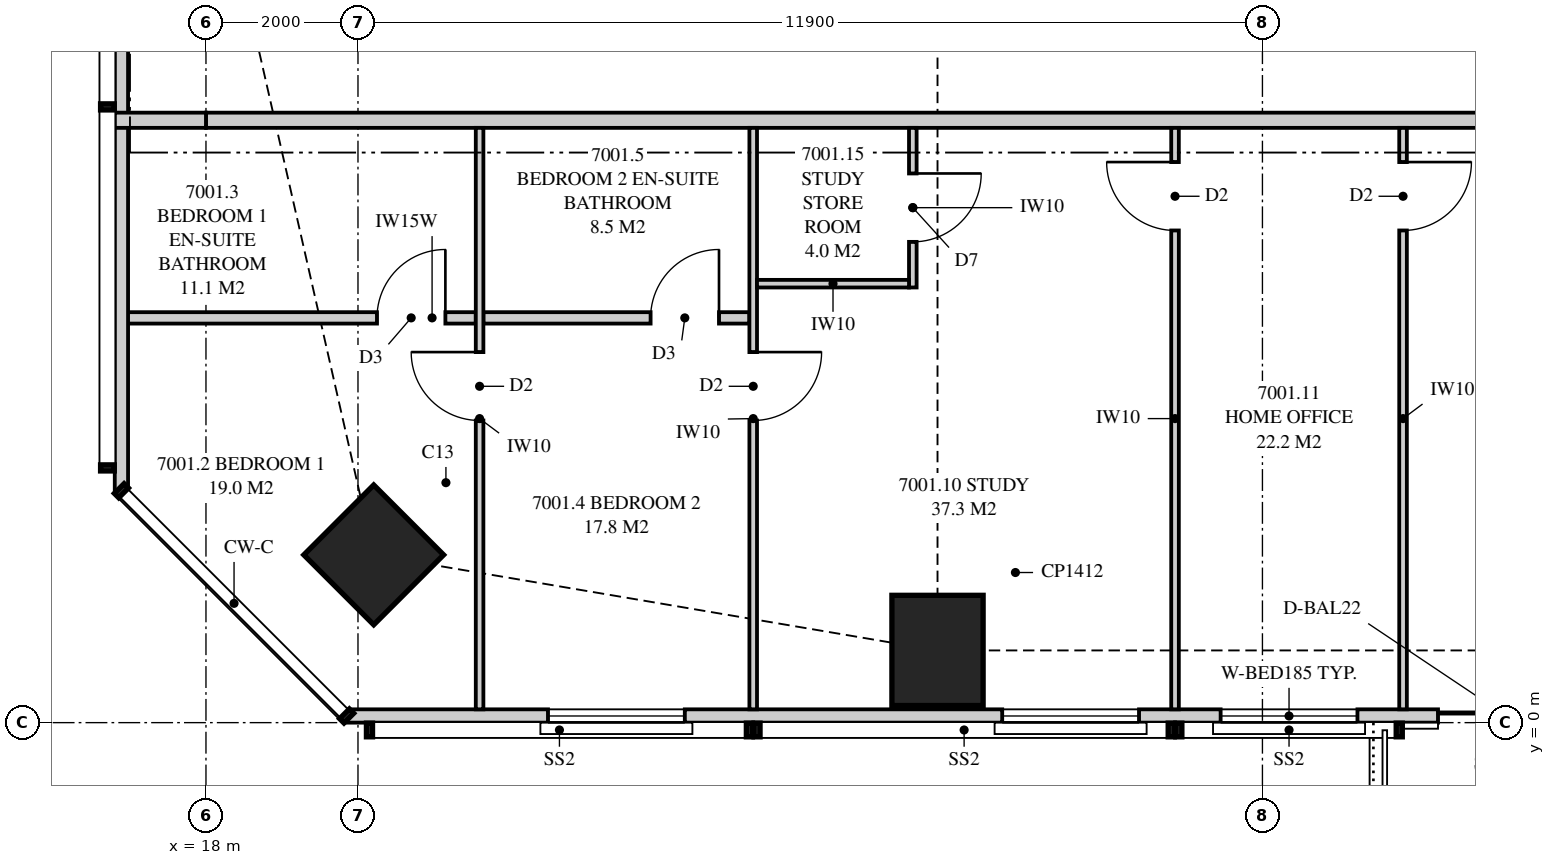
"""IFC4 building model, lengths in metres.
Left out: names, types, materials, properties, quantities, classifications, styles, units other than length and angle.
Written with IfcOpenShell. Run it as: python <this file> out.ifc"""

import sys

from ifc_helpers import new_model, si_unit, direction, frame, frame_2d, origin, origin_2d, place, context, subcontext, project, spatial, polyline, rectangle, outline, extrude, element, fill, save


model = new_model("IFC4")
c1 = context("Model", 3, precision=1e-05, world=origin(), true_north=direction((0.0, 1.0)))
c2 = subcontext(c1, "Body", "Model", "MODEL_VIEW")
j1 = project(units=[si_unit("LENGTHUNIT", "METRE"), si_unit("PLANEANGLEUNIT", "RADIAN")], contexts=[c1])
p1 = place(None, origin())
s1 = spatial("IfcSite", under=j1, at=p1, CompositionType="ELEMENT")
p2 = place(p1, origin())
s2 = spatial("IfcBuilding", under=s1, at=p2, CompositionType="ELEMENT")
p3 = place(p2, frame((0.0, 0.0, 256.45)))
s3 = spatial("IfcBuildingStorey", under=s2, at=p3, CompositionType="ELEMENT", Elevation=256.45)
p4 = place(p3, frame((20.207, 2.207, 0.0), z_axis=(0.0, 0.0, 1.0), x_axis=(0.707106781187, 0.707106781187, 0.0)))
e1 = element("IfcColumn", 1, at=p4, inside=s3, PredefinedType="COLUMN", context=c2, shape_type="SweptSolid", body=[
    extrude(rectangle(XDim=1.3, YDim=1.3, at=origin_2d()), origin(), (0.0, 0.0, 1.0), 3.5),
])
p5 = place(p3, frame((27.625, 0.95, 0.0), z_axis=(0.0, 0.0, 1.0), x_axis=(0.0, 1.0, 0.0)))
e2 = element("IfcColumn", 2, at=p5, inside=s3, PredefinedType="COLUMN", context=c2, shape_type="SweptSolid", body=[
    extrude(rectangle(XDim=1.45, YDim=1.2, at=origin_2d()), origin(), (0.0, 0.0, 1.0), 3.5),
])
p6 = place(p3, frame((19.851, 0.087, 0.0), z_axis=(0.0, 0.0, 1.0), x_axis=(1.0, 0.0, 0.0)))
e3 = element("IfcWall", 3, at=p6, inside=s3, PredefinedType="SOLIDWALL", context=c2, shape_type="SweptSolid", body=[
    extrude(outline(polyline([(0.0, 0.0), (33.597, 0.0), (33.597, 3.26), (27.239, 3.26), (27.239, 2.3), (27.155, 2.3), (27.155, 3.26), (27.024, 3.26), (27.024, 2.3), (7.774, 2.3), (7.774, 3.26), (7.642, 3.26), (7.642, 2.3), (7.559, 2.3), (7.559, 3.26), (0.0, 3.26), (0.0, 0.0)])), frame((0.0, 0.087, 0.0), z_axis=(0.0, -1.0, 0.0), x_axis=(1.0, 0.0, 0.0)), (0.0, 0.0, 1.0), 0.175),
])
p7 = place(p6, frame((2.649, 0.0, 0.4)))
e4 = element("IfcOpeningElement", 4, at=p7, cuts=e3, PredefinedType="OPENING", context=c2, shape_type="SweptSolid", body=[
    extrude(rectangle(XDim=1.8, YDim=1.85, at=frame_2d((0.9, 0.925))), frame((0.0, 0.097, 0.0), z_axis=(0.0, -1.0, 0.0), x_axis=(1.0, 0.0, 0.0)), (0.0, 0.0, 1.0), 0.195),
])
p8 = place(p6, frame((8.625, 0.0, 0.4)))
e5 = element("IfcOpeningElement", 5, at=p8, cuts=e3, PredefinedType="OPENING", context=c2, shape_type="SweptSolid", body=[
    extrude(rectangle(XDim=1.8, YDim=1.85, at=frame_2d((0.9, 0.925))), frame((0.0, 0.097, 0.0), z_axis=(0.0, -1.0, 0.0), x_axis=(1.0, 0.0, 0.0)), (0.0, 0.0, 1.0), 0.195),
])
p9 = place(p6, frame((11.499, 0.0, 0.4)))
e6 = element("IfcOpeningElement", 6, at=p9, cuts=e3, PredefinedType="OPENING", context=c2, shape_type="SweptSolid", body=[
    extrude(rectangle(XDim=1.8, YDim=1.85, at=frame_2d((0.9, 0.925))), frame((0.0, 0.097, 0.0), z_axis=(0.0, -1.0, 0.0), x_axis=(1.0, 0.0, 0.0)), (0.0, 0.0, 1.0), 0.195),
])
p10 = place(p6, frame((14.359, 0.0, 0.0)))
e7 = element("IfcOpeningElement", 7, at=p10, cuts=e3, PredefinedType="OPENING", context=c2, shape_type="SweptSolid", body=[
    extrude(rectangle(XDim=1.8, YDim=2.25, at=frame_2d((0.9, 1.125))), frame((0.0, 0.097, 0.0), z_axis=(0.0, -1.0, 0.0), x_axis=(1.0, 0.0, 0.0)), (0.0, 0.0, 1.0), 0.195),
])
p11 = place(p6, frame((19.299, 0.0, 0.4)))
e8 = element("IfcOpeningElement", 8, at=p11, cuts=e3, PredefinedType="OPENING", context=c2, shape_type="SweptSolid", body=[
    extrude(rectangle(XDim=1.8, YDim=1.85, at=frame_2d((0.9, 0.925))), frame((0.0, 0.097, 0.0), z_axis=(0.0, -1.0, 0.0), x_axis=(1.0, 0.0, 0.0)), (0.0, 0.0, 1.0), 0.195),
])
p12 = place(p6, frame((23.674, 0.0, 0.4)))
e9 = element("IfcOpeningElement", 9, at=p12, cuts=e3, PredefinedType="OPENING", context=c2, shape_type="SweptSolid", body=[
    extrude(rectangle(XDim=2.4, YDim=1.85, at=frame_2d((1.2, 0.925))), frame((0.0, 0.097, 0.0), z_axis=(0.0, -1.0, 0.0), x_axis=(1.0, 0.0, 0.0)), (0.0, 0.0, 1.0), 0.195),
])
p13 = place(p6, frame((30.349, 0.0, 0.4)))
e10 = element("IfcOpeningElement", 10, at=p13, cuts=e3, PredefinedType="OPENING", context=c2, shape_type="SweptSolid", body=[
    extrude(rectangle(XDim=1.8, YDim=1.85, at=frame_2d((0.9, 0.925))), frame((0.0, 0.097, 0.0), z_axis=(0.0, -1.0, 0.0), x_axis=(1.0, 0.0, 0.0)), (0.0, 0.0, 1.0), 0.195),
])
p14 = place(p3, frame((16.887, 30.949, 0.0), z_axis=(0.0, 0.0, 1.0), x_axis=(0.0, -1.0, 0.0)))
e11 = element("IfcWall", 11, at=p14, inside=s3, PredefinedType="SOLIDWALL", context=c2, shape_type="SweptSolid", body=[
    extrude(outline(polyline([(0.0, 0.0), (27.897, 0.0), (27.897, 3.26), (18.148, 3.26), (18.148, 2.3), (18.125, 2.3), (18.125, 3.26), (17.949, 3.26), (17.949, 2.3), (5.949, 2.3), (5.949, 3.26), (0.0, 3.26), (0.0, 0.0)])), frame((0.0, 0.087, 0.0), z_axis=(0.0, -1.0, 0.0), x_axis=(1.0, 0.0, 0.0)), (0.0, 0.0, 1.0), 0.175),
])
p15 = place(p14, frame((11.849, 0.0, 0.4)))
e12 = element("IfcOpeningElement", 12, at=p15, cuts=e11, PredefinedType="OPENING", context=c2, shape_type="SweptSolid", body=[
    extrude(rectangle(XDim=1.2, YDim=1.85, at=frame_2d((0.6, 0.925))), frame((0.0, 0.097, 0.0), z_axis=(0.0, -1.0, 0.0), x_axis=(1.0, 0.0, 0.0)), (0.0, 0.0, 1.0), 0.195),
])
p16 = place(p3, frame((18.0, 7.925, 0.0), z_axis=(0.0, 0.0, 1.0), x_axis=(1.0, 0.0, 0.0)))
e13 = element("IfcWall", 13, at=p16, inside=s3, PredefinedType="PARTITIONING", context=c2, shape_type="SweptSolid", body=[
    extrude(outline(polyline([(0.0, 0.0), (38.325, 0.0), (38.325, 3.26), (37.875, 3.26), (37.875, 2.3), (36.043, 2.3), (36.043, 3.26), (30.185, 3.26), (30.185, 2.66), (27.565, 2.66), (27.565, 3.26), (20.56, 3.26), (20.56, 2.66), (17.94, 2.66), (17.94, 3.26), (10.935, 3.26), (10.935, 2.66), (8.315, 2.66), (8.315, 3.26), (1.839, 3.26), (1.839, 2.3), (0.0, 2.3), (0.0, 3.26), (0.0, 0.0)])), frame((0.0, 0.1, 0.0), z_axis=(0.0, -1.0, 0.0), x_axis=(1.0, 0.0, 0.0)), (0.0, 0.0, 1.0), 0.2),
])
p17 = place(p16, frame((18.75, 0.0, 0.0)))
e14 = element("IfcOpeningElement", 14, at=p17, cuts=e13, PredefinedType="OPENING", context=c2, shape_type="SweptSolid", body=[
    extrude(rectangle(XDim=1.05, YDim=2.2, at=frame_2d((0.525, 1.1))), frame((0.0, 0.11, 0.0), z_axis=(0.0, -1.0, 0.0), x_axis=(1.0, 0.0, 0.0)), (0.0, 0.0, 1.0), 0.22),
])
p18 = place(p3, frame((21.6, 0.175, 0.0), z_axis=(0.0, 0.0, 1.0), x_axis=(0.0, 1.0, 0.0)))
e15 = element("IfcWall", 15, at=p18, inside=s3, PredefinedType="PARTITIONING", context=c2, shape_type="SweptSolid", body=[
    extrude(outline(polyline([(0.0, 0.0), (7.65, 0.0), (7.65, 3.26), (2.668, 3.26), (2.668, 2.3), (0.924, 2.3), (0.924, 3.26), (0.0, 3.26), (0.0, 0.0)])), frame((0.0, 0.05, 0.0), z_axis=(0.0, -1.0, 0.0), x_axis=(1.0, 0.0, 0.0)), (0.0, 0.0, 1.0), 0.1),
])
p19 = place(p18, frame((3.8, 0.0, 0.0)))
e16 = element("IfcOpeningElement", 16, at=p19, cuts=e15, PredefinedType="OPENING", context=c2, shape_type="SweptSolid", body=[
    extrude(rectangle(XDim=0.9, YDim=2.1, at=frame_2d((0.45, 1.05))), frame((0.0, 0.06, 0.0), z_axis=(0.0, -1.0, 0.0), x_axis=(1.0, 0.0, 0.0)), (0.0, 0.0, 1.0), 0.12),
])
p20 = place(p3, frame((25.2, 0.175, 0.0), z_axis=(0.0, 0.0, 1.0), x_axis=(0.0, 1.0, 0.0)))
e17 = element("IfcWall", 17, at=p20, inside=s3, PredefinedType="PARTITIONING", context=c2, shape_type="SweptSolid", body=[
    extrude(outline(polyline([(0.0, 0.0), (7.65, 0.0), (7.65, 3.26), (2.058, 3.26), (2.058, 2.3), (0.314, 2.3), (0.314, 3.26), (0.0, 3.26), (0.0, 0.0)])), frame((0.0, 0.05, 0.0), z_axis=(0.0, -1.0, 0.0), x_axis=(1.0, 0.0, 0.0)), (0.0, 0.0, 1.0), 0.1),
])
p21 = place(p20, frame((3.8, 0.0, 0.0)))
e18 = element("IfcOpeningElement", 18, at=p21, cuts=e17, PredefinedType="OPENING", context=c2, shape_type="SweptSolid", body=[
    extrude(rectangle(XDim=0.9, YDim=2.1, at=frame_2d((0.45, 1.05))), frame((0.0, 0.06, 0.0), z_axis=(0.0, -1.0, 0.0), x_axis=(1.0, 0.0, 0.0)), (0.0, 0.0, 1.0), 0.12),
])
p22 = place(p3, frame((16.8, 5.325, 0.0), z_axis=(0.0, 0.0, 1.0), x_axis=(1.0, 0.0, 0.0)))
e19 = element("IfcWall", 19, at=p22, inside=s3, PredefinedType="PLUMBINGWALL", context=c2, shape_type="SweptSolid", body=[
    extrude(outline(polyline([(0.0, 0.0), (4.75, 0.0), (4.75, 3.26), (3.605, 3.26), (3.605, 2.3), (1.79, 2.3), (1.79, 3.26), (0.0, 3.26), (0.0, 0.0)])), frame((0.0, 0.075, 0.0), z_axis=(0.0, -1.0, 0.0), x_axis=(1.0, 0.0, 0.0)), (0.0, 0.0, 1.0), 0.15),
])
p23 = place(p22, frame((3.45, 0.0, 0.0)))
e20 = element("IfcOpeningElement", 20, at=p23, cuts=e19, PredefinedType="OPENING", context=c2, shape_type="SweptSolid", body=[
    extrude(rectangle(XDim=0.9, YDim=2.1, at=frame_2d((0.45, 1.05))), frame((0.0, 0.085, 0.0), z_axis=(0.0, -1.0, 0.0), x_axis=(1.0, 0.0, 0.0)), (0.0, 0.0, 1.0), 0.17),
])
p24 = place(p3, frame((21.65, 5.325, 0.0), z_axis=(0.0, 0.0, 1.0), x_axis=(1.0, 0.0, 0.0)))
e21 = element("IfcWall", 21, at=p24, inside=s3, PredefinedType="PLUMBINGWALL", context=c2, shape_type="SweptSolid", body=[
    extrude(rectangle(XDim=3.5, YDim=0.15, at=frame_2d((1.75, 0.0))), origin(), (0.0, 0.0, 1.0), 3.26),
])
p25 = place(p24, frame((2.2, 0.0, 0.0)))
e22 = element("IfcOpeningElement", 22, at=p25, cuts=e21, PredefinedType="OPENING", context=c2, shape_type="SweptSolid", body=[
    extrude(rectangle(XDim=0.9, YDim=2.1, at=frame_2d((0.45, 1.05))), frame((0.0, 0.085, 0.0), z_axis=(0.0, -1.0, 0.0), x_axis=(1.0, 0.0, 0.0)), (0.0, 0.0, 1.0), 0.17),
])
p26 = place(p3, frame((30.75, 0.175, 0.0), z_axis=(0.0, 0.0, 1.0), x_axis=(0.0, 1.0, 0.0)))
e23 = element("IfcWall", 23, at=p26, inside=s3, PredefinedType="PARTITIONING", context=c2, shape_type="SweptSolid", body=[
    extrude(outline(polyline([(0.0, 0.0), (7.65, 0.0), (7.65, 3.26), (1.635, 3.26), (1.635, 2.3), (0.0, 2.3), (0.0, 3.26), (0.0, 0.0)])), frame((0.0, 0.05, 0.0), z_axis=(0.0, -1.0, 0.0), x_axis=(1.0, 0.0, 0.0)), (0.0, 0.0, 1.0), 0.1),
])
p27 = place(p26, frame((6.3, 0.0, 0.0)))
e24 = element("IfcOpeningElement", 24, at=p27, cuts=e23, PredefinedType="OPENING", context=c2, shape_type="SweptSolid", body=[
    extrude(rectangle(XDim=0.9, YDim=2.1, at=frame_2d((0.45, 1.05))), frame((0.0, 0.06, 0.0), z_axis=(0.0, -1.0, 0.0), x_axis=(1.0, 0.0, 0.0)), (0.0, 0.0, 1.0), 0.12),
])
p28 = place(p3, frame((33.75, 0.175, 0.0), z_axis=(0.0, 0.0, 1.0), x_axis=(0.0, 1.0, 0.0)))
e25 = element("IfcWall", 25, at=p28, inside=s3, PredefinedType="PARTITIONING", context=c2, shape_type="SweptSolid", body=[
    extrude(outline(polyline([(0.0, 0.0), (7.65, 0.0), (7.65, 3.26), (1.635, 3.26), (1.635, 2.3), (0.0, 2.3), (0.0, 3.26), (0.0, 0.0)])), frame((0.0, 0.05, 0.0), z_axis=(0.0, -1.0, 0.0), x_axis=(1.0, 0.0, 0.0)), (0.0, 0.0, 1.0), 0.1),
])
p29 = place(p28, frame((6.3, 0.0, 0.0)))
e26 = element("IfcOpeningElement", 26, at=p29, cuts=e25, PredefinedType="OPENING", context=c2, shape_type="SweptSolid", body=[
    extrude(rectangle(XDim=0.9, YDim=2.1, at=frame_2d((0.45, 1.05))), frame((0.0, 0.06, 0.0), z_axis=(0.0, -1.0, 0.0), x_axis=(1.0, 0.0, 0.0)), (0.0, 0.0, 1.0), 0.12),
])
p30 = place(p3, frame((16.8, 7.925, 0.0), z_axis=(0.0, 0.0, 1.0), x_axis=(1.0, 0.0, 0.0)))
e27 = element("IfcWall", 27, at=p30, inside=s3, PredefinedType="PARTITIONING", context=c2, shape_type="SweptSolid", body=[
    extrude(outline(polyline([(0.0, 0.0), (1.2, 0.0), (1.2, 3.26), (1.2, 2.3), (1.172, 2.3), (1.172, 3.26), (0.0, 3.26), (0.0, 0.0)])), frame((0.0, 0.1, 0.0), z_axis=(0.0, -1.0, 0.0), x_axis=(1.0, 0.0, 0.0)), (0.0, 0.0, 1.0), 0.2),
])
p31 = place(p3, frame((27.3, 7.825, 0.0), z_axis=(0.0, 0.0, 1.0), x_axis=(0.0, -1.0, 0.0)))
e28 = element("IfcWall", 28, at=p31, inside=s3, PredefinedType="PARTITIONING", context=c2, shape_type="SweptSolid", body=[
    extrude(outline(polyline([(0.0, 0.0), (2.1, 0.0), (2.1, 3.26), (2.1, 2.66), (0.0, 2.66), (0.0, 3.26), (0.0, 0.0)])), frame((0.0, 0.05, 0.0), z_axis=(0.0, -1.0, 0.0), x_axis=(1.0, 0.0, 0.0)), (0.0, 0.0, 1.0), 0.1),
])
p32 = place(p31, frame((0.6, 0.0, 0.0)))
e29 = element("IfcOpeningElement", 29, at=p32, cuts=e28, PredefinedType="OPENING", context=c2, shape_type="SweptSolid", body=[
    extrude(rectangle(XDim=0.9, YDim=2.1, at=frame_2d((0.45, 1.05))), frame((0.0, 0.06, 0.0), z_axis=(0.0, -1.0, 0.0), x_axis=(1.0, 0.0, 0.0)), (0.0, 0.0, 1.0), 0.12),
])
p33 = place(p3, frame((25.25, 5.775, 0.0), z_axis=(0.0, 0.0, 1.0), x_axis=(1.0, 0.0, 0.0)))
e30 = element("IfcWall", 30, at=p33, inside=s3, PredefinedType="PARTITIONING", context=c2, shape_type="SweptSolid", body=[
    extrude(outline(polyline([(0.0, 0.0), (2.0, 0.0), (2.0, 3.26), (2.0, 2.66), (1.115, 2.66), (1.115, 3.26), (0.0, 3.26), (0.0, 0.0)])), frame((0.0, 0.05, 0.0), z_axis=(0.0, -1.0, 0.0), x_axis=(1.0, 0.0, 0.0)), (0.0, 0.0, 1.0), 0.1),
])
p34 = place(p7, origin())
e31 = element("IfcWindow", 31, at=p34, inside=s3, PartitioningType="SINGLE_PANEL", PredefinedType="WINDOW", context=c2, shape_type="SweptSolid", body=[
    extrude(rectangle(XDim=1.8, YDim=1.85, at=frame_2d((0.9, 0.925))), frame((0.0, 0.03, 0.0), z_axis=(0.0, -1.0, 0.0), x_axis=(1.0, 0.0, 0.0)), (0.0, 0.0, 1.0), 0.06),
])
fill(e4, e31)
p35 = place(p8, origin())
e32 = element("IfcWindow", 32, at=p35, inside=s3, PartitioningType="SINGLE_PANEL", PredefinedType="WINDOW", context=c2, shape_type="SweptSolid", body=[
    extrude(rectangle(XDim=1.8, YDim=1.85, at=frame_2d((0.9, 0.925))), frame((0.0, 0.03, 0.0), z_axis=(0.0, -1.0, 0.0), x_axis=(1.0, 0.0, 0.0)), (0.0, 0.0, 1.0), 0.06),
])
fill(e5, e32)
p36 = place(p9, origin())
e33 = element("IfcWindow", 33, at=p36, inside=s3, PartitioningType="SINGLE_PANEL", PredefinedType="WINDOW", context=c2, shape_type="SweptSolid", body=[
    extrude(rectangle(XDim=1.8, YDim=1.85, at=frame_2d((0.9, 0.925))), frame((0.0, 0.03, 0.0), z_axis=(0.0, -1.0, 0.0), x_axis=(1.0, 0.0, 0.0)), (0.0, 0.0, 1.0), 0.06),
])
fill(e6, e33)
p37 = place(p10, origin())
e34 = element("IfcDoor", 34, at=p37, inside=s3, OperationType="SLIDING_TO_LEFT", PredefinedType="DOOR", context=c2, shape_type="SweptSolid", body=[
    extrude(rectangle(XDim=1.8, YDim=2.25, at=frame_2d((0.9, 1.125))), frame((0.0, 0.025, 0.0), z_axis=(0.0, -1.0, 0.0), x_axis=(1.0, 0.0, 0.0)), (0.0, 0.0, 1.0), 0.05),
])
fill(e7, e34)
p38 = place(p19, origin())
e35 = element("IfcDoor", 35, at=p38, inside=s3, OperationType="SINGLE_SWING_RIGHT", PredefinedType="DOOR", context=c2, shape_type="SweptSolid", body=[
    extrude(rectangle(XDim=0.9, YDim=2.1, at=frame_2d((0.45, 1.05))), frame((0.0, 0.025, 0.0), z_axis=(0.0, -1.0, 0.0), x_axis=(1.0, 0.0, 0.0)), (0.0, 0.0, 1.0), 0.05),
])
fill(e16, e35)
p39 = place(p23, origin())
e36 = element("IfcDoor", 36, at=p39, inside=s3, OperationType="SINGLE_SWING_RIGHT", PredefinedType="DOOR", context=c2, shape_type="SweptSolid", body=[
    extrude(rectangle(XDim=0.9, YDim=2.1, at=frame_2d((0.45, 1.05))), frame((0.0, 0.025, 0.0), z_axis=(0.0, -1.0, 0.0), x_axis=(1.0, 0.0, 0.0)), (0.0, 0.0, 1.0), 0.05),
])
fill(e20, e36)
p40 = place(p21, frame((0.9, 0.0, 0.0), z_axis=(0.0, 0.0, 1.0), x_axis=(-1.0, 0.0, 0.0)))
e37 = element("IfcDoor", 37, at=p40, inside=s3, OperationType="SINGLE_SWING_LEFT", PredefinedType="DOOR", context=c2, shape_type="SweptSolid", body=[
    extrude(rectangle(XDim=0.9, YDim=2.1, at=frame_2d((0.45, 1.05))), frame((0.0, 0.025, 0.0), z_axis=(0.0, -1.0, 0.0), x_axis=(1.0, 0.0, 0.0)), (0.0, 0.0, 1.0), 0.05),
])
fill(e18, e37)
p41 = place(p25, origin())
e38 = element("IfcDoor", 38, at=p41, inside=s3, OperationType="SINGLE_SWING_RIGHT", PredefinedType="DOOR", context=c2, shape_type="SweptSolid", body=[
    extrude(rectangle(XDim=0.9, YDim=2.1, at=frame_2d((0.45, 1.05))), frame((0.0, 0.025, 0.0), z_axis=(0.0, -1.0, 0.0), x_axis=(1.0, 0.0, 0.0)), (0.0, 0.0, 1.0), 0.05),
])
fill(e22, e38)
p42 = place(p27, origin())
e39 = element("IfcDoor", 39, at=p42, inside=s3, OperationType="SINGLE_SWING_RIGHT", PredefinedType="DOOR", context=c2, shape_type="SweptSolid", body=[
    extrude(rectangle(XDim=0.9, YDim=2.1, at=frame_2d((0.45, 1.05))), frame((0.0, 0.025, 0.0), z_axis=(0.0, -1.0, 0.0), x_axis=(1.0, 0.0, 0.0)), (0.0, 0.0, 1.0), 0.05),
])
fill(e24, e39)
p43 = place(p29, frame((0.9, 0.0, 0.0), z_axis=(0.0, 0.0, 1.0), x_axis=(-1.0, 0.0, 0.0)))
e40 = element("IfcDoor", 40, at=p43, inside=s3, OperationType="SINGLE_SWING_LEFT", PredefinedType="DOOR", context=c2, shape_type="SweptSolid", body=[
    extrude(rectangle(XDim=0.9, YDim=2.1, at=frame_2d((0.45, 1.05))), frame((0.0, 0.025, 0.0), z_axis=(0.0, -1.0, 0.0), x_axis=(1.0, 0.0, 0.0)), (0.0, 0.0, 1.0), 0.05),
])
fill(e26, e40)
p44 = place(p32, origin())
e41 = element("IfcDoor", 41, at=p44, inside=s3, OperationType="SINGLE_SWING_LEFT", PredefinedType="DOOR", context=c2, shape_type="SweptSolid", body=[
    extrude(rectangle(XDim=0.9, YDim=2.1, at=frame_2d((0.45, 1.05))), frame((0.0, 0.025, 0.0), z_axis=(0.0, -1.0, 0.0), x_axis=(1.0, 0.0, 0.0)), (0.0, 0.0, 1.0), 0.05),
])
fill(e29, e41)
save(model, sys.argv[1])
